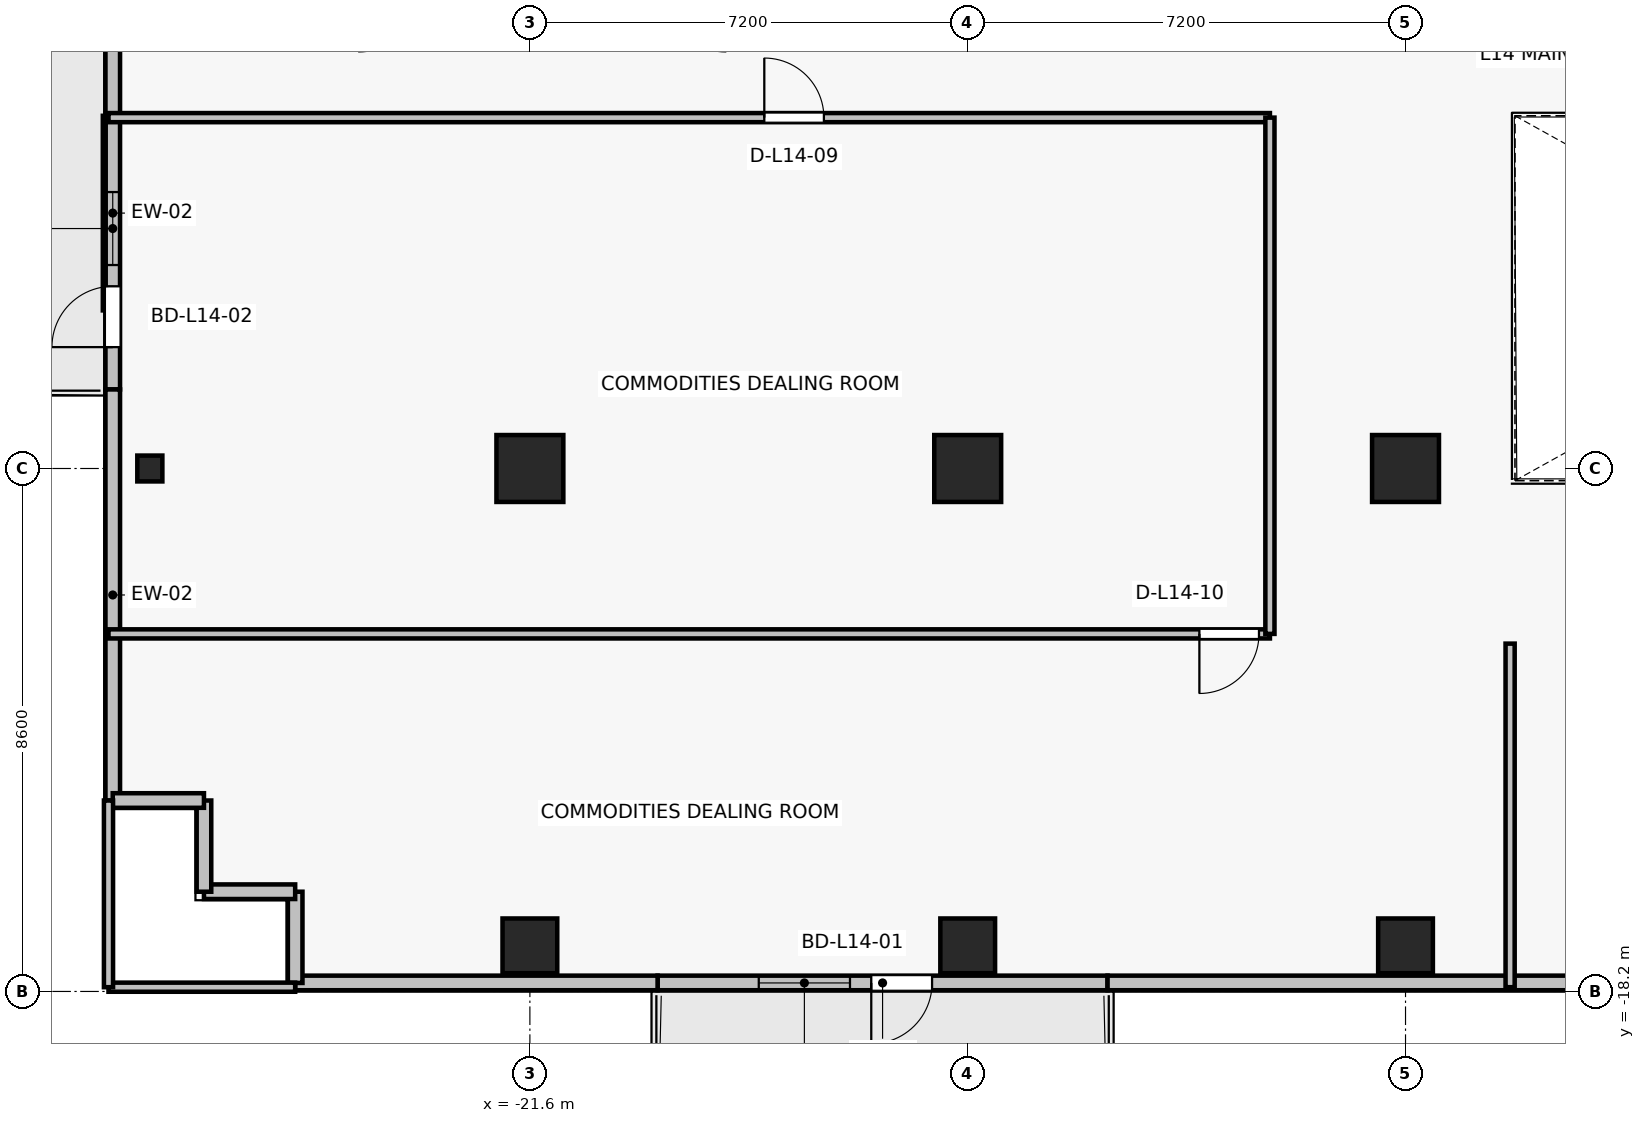
"""IFC4 building model, lengths in metres.
Left out: names, types, materials, properties, quantities, classifications, styles, units other than length and angle.
Written with IfcOpenShell. Run it as: python <this file> out.ifc"""

import sys

from ifc_helpers import new_model, si_unit, direction, frame, frame_2d, origin, origin_2d, place, context, subcontext, project, spatial, rectangle, i_section, extrude, source, transform, mapped, element, fill, save


model = new_model("IFC4")
c1 = context("Model", 3, precision=1e-05, world=origin(), true_north=direction((0.0, 1.0)))
c2 = subcontext(c1, "Body", "Model", "MODEL_VIEW")
j1 = project(units=[si_unit("LENGTHUNIT", "METRE"), si_unit("PLANEANGLEUNIT", "RADIAN")], contexts=[c1])
p1 = place(None, origin())
s1 = spatial("IfcSite", under=j1, at=p1, CompositionType="ELEMENT")
p2 = place(p1, origin())
s2 = spatial("IfcBuilding", under=s1, at=p2, CompositionType="ELEMENT")
p3 = place(p2, frame((0.0, 0.0, 53.8)))
s3 = spatial("IfcBuildingStorey", under=s2, at=p3, CompositionType="ELEMENT", Elevation=53.8)
for number, where, z_axis, x_axis in (
    (1, (-14.4, -9.6, 0.0), (0.0, 0.0, 1.0), (1.0, 0.0, 0.0)),
    (2, (-7.2, -9.6, 0.0), (0.0, 0.0, 1.0), (1.0, 0.0, 0.0)),
    (3, (-21.6, -9.6, 0.0), (0.0, 0.0, 1.0), (1.0, 0.0, 0.0)),
):
    element("IfcColumn", number, at=place(p3, frame(where, z_axis=z_axis, x_axis=x_axis)), inside=s3, PredefinedType="COLUMN", context=c2, shape_type="SweptSolid", body=[
        extrude(rectangle(XDim=1.1, YDim=1.1, at=origin_2d()), origin(), (0.0, 0.0, 1.0), 3.3),
    ])
for number, where, z_axis, x_axis in (
    (4, (-14.4, -17.45, 0.0), (0.0, 0.0, 1.0), (1.0, 0.0, 0.0)),
    (5, (-7.2, -17.45, 0.0), (0.0, 0.0, 1.0), (1.0, 0.0, 0.0)),
    (6, (-21.6, -17.45, 0.0), (0.0, 0.0, 1.0), (1.0, 0.0, 0.0)),
):
    element("IfcColumn", number, at=place(p3, frame(where, z_axis=z_axis, x_axis=x_axis)), inside=s3, PredefinedType="COLUMN", context=c2, shape_type="SweptSolid", body=[
        extrude(rectangle(XDim=0.9, YDim=0.9, at=origin_2d()), origin(), (0.0, 0.0, 1.0), 3.3),
    ])
p4 = place(p3, frame((-27.85, -9.6, 0.0), z_axis=(0.0, 0.0, 1.0), x_axis=(1.0, 0.0, 0.0)))
e7 = element("IfcColumn", 7, at=p4, inside=s3, PredefinedType="COLUMN", context=c2, shape_type="SweptSolid", body=[
    extrude(i_section(OverallWidth=0.412, OverallDepth=0.425, WebThickness=0.026, FlangeThickness=0.039, FilletRadius=0.015, at=origin_2d()), origin(), (0.0, 0.0, 1.0), 3.3),
])
p5 = place(p3, frame((-12.1, -18.06, 0.0), z_axis=(0.0, 0.0, 1.0), x_axis=(-1.0, 0.0, 0.0)))
e8 = element("IfcWall", 8, at=p5, inside=s3, PredefinedType="SOLIDWALL", context=c2, shape_type="SweptSolid", body=[
    extrude(rectangle(XDim=7.4, YDim=0.24, at=frame_2d((3.7, 0.0))), origin(), (0.0, 0.0, 1.0), 2.665),
])
p6 = place(p5, frame((2.886, 0.0, 0.0)))
e9 = element("IfcOpeningElement", 9, at=p6, cuts=e8, PredefinedType="OPENING", context=c2, shape_type="SweptSolid", body=[
    extrude(rectangle(XDim=1.0, YDim=2.2, at=frame_2d((0.5, 1.1))), frame((0.0, 0.13, 0.0), z_axis=(0.0, -1.0, 0.0), x_axis=(1.0, 0.0, 0.0)), (0.0, 0.0, 1.0), 0.26),
])
p7 = place(p5, frame((4.236, 0.0, 0.85)))
e10 = element("IfcOpeningElement", 10, at=p7, cuts=e8, PredefinedType="OPENING", context=c2, shape_type="SweptSolid", body=[
    extrude(rectangle(XDim=1.5, YDim=1.6, at=frame_2d((0.75, 0.8))), frame((0.0, 0.13, 0.0), z_axis=(0.0, -1.0, 0.0), x_axis=(1.0, 0.0, 0.0)), (0.0, 0.0, 1.0), 0.26),
])
p8 = place(p3, frame((-28.46, -8.3, 0.0), z_axis=(0.0, 0.0, 1.0), x_axis=(0.0, 1.0, 0.0)))
e11 = element("IfcWall", 11, at=p8, inside=s3, PredefinedType="SOLIDWALL", context=c2, shape_type="SweptSolid", body=[
    extrude(rectangle(XDim=5.8, YDim=0.24, at=frame_2d((2.9, 0.0))), origin(), (0.0, 0.0, 1.0), 3.075),
])
p9 = place(p8, frame((0.696, 0.0, 0.0)))
e12 = element("IfcOpeningElement", 12, at=p9, cuts=e11, PredefinedType="OPENING", context=c2, shape_type="SweptSolid", body=[
    extrude(rectangle(XDim=1.0, YDim=2.2, at=frame_2d((0.5, 1.1))), frame((0.0, 0.13, 0.0), z_axis=(0.0, -1.0, 0.0), x_axis=(1.0, 0.0, 0.0)), (0.0, 0.0, 1.0), 0.26),
])
p10 = place(p8, frame((2.046, 0.0, 0.85)))
e13 = element("IfcOpeningElement", 13, at=p10, cuts=e11, PredefinedType="OPENING", context=c2, shape_type="SweptSolid", body=[
    extrude(rectangle(XDim=1.2, YDim=1.5, at=frame_2d((0.6, 0.75))), frame((0.0, 0.13, 0.0), z_axis=(0.0, -1.0, 0.0), x_axis=(1.0, 0.0, 0.0)), (0.0, 0.0, 1.0), 0.26),
])
p11 = place(p3, frame((-28.46, -8.3, 0.0), z_axis=(0.0, 0.0, 1.0), x_axis=(0.0, -1.0, 0.0)))
e14 = element("IfcWall", 14, at=p11, inside=s3, PredefinedType="SOLIDWALL", context=c2, shape_type="SweptSolid", body=[
    extrude(rectangle(XDim=6.76, YDim=0.24, at=frame_2d((3.38, 0.0))), origin(), (0.0, 0.0, 1.0), 3.075),
])
p12 = place(p3, frame((-12.1, -18.06, 0.0), z_axis=(0.0, 0.0, 1.0), x_axis=(1.0, 0.0, 0.0)))
e15 = element("IfcWall", 15, at=p12, inside=s3, PredefinedType="SOLIDWALL", context=c2, shape_type="SweptSolid", body=[
    extrude(rectangle(XDim=8.76, YDim=0.24, at=frame_2d((4.38, 0.0))), origin(), (0.0, 0.0, 1.0), 3.075),
])
p13 = place(p3, frame((-25.46, -18.06, 0.0), z_axis=(0.0, 0.0, 1.0), x_axis=(1.0, 0.0, 0.0)))
e16 = element("IfcWall", 16, at=p13, inside=s3, PredefinedType="SOLIDWALL", context=c2, shape_type="SweptSolid", body=[
    extrude(rectangle(XDim=5.96, YDim=0.24, at=frame_2d((2.98, 0.0))), origin(), (0.0, 0.0, 1.0), 2.665),
])
for number, where, z_axis, x_axis in (
    (17, (-25.46, -16.56, 0.0), (0.0, 0.0, 1.0), (0.0, -1.0, 0.0)),
    (18, (-26.96, -16.56, 0.0), (0.0, 0.0, 1.0), (1.0, 0.0, 0.0)),
    (19, (-26.96, -15.06, 0.0), (0.0, 0.0, 1.0), (0.0, -1.0, 0.0)),
    (20, (-28.46, -15.06, 0.0), (0.0, 0.0, 1.0), (1.0, 0.0, 0.0)),
):
    element("IfcWall", number, at=place(p3, frame(where, z_axis=z_axis, x_axis=x_axis)), inside=s3, PredefinedType="SOLIDWALL", context=c2, shape_type="SweptSolid", body=[
        extrude(rectangle(XDim=1.5, YDim=0.24, at=frame_2d((0.75, 0.0))), origin(), (0.0, 0.0, 1.0), 3.075),
    ])
p14 = place(p3, frame((-9.43, -12.32, 0.0), z_axis=(0.0, 0.0, 1.0), x_axis=(-1.0, 0.0, 0.0)))
e21 = element("IfcWall", 21, at=p14, inside=s3, PredefinedType="PARTITIONING", context=c2, shape_type="SweptSolid", body=[
    extrude(rectangle(XDim=19.1, YDim=0.15, at=frame_2d((9.55, 0.0))), origin(), (0.0, 0.0, 1.0), 2.465),
])
p15 = place(p14, frame((0.18, 0.0, 0.0)))
e22 = element("IfcOpeningElement", 22, at=p15, cuts=e21, PredefinedType="OPENING", context=c2, shape_type="SweptSolid", body=[
    extrude(rectangle(XDim=0.98, YDim=2.15, at=frame_2d((0.49, 1.075))), frame((0.0, 0.085, 0.0), z_axis=(0.0, -1.0, 0.0), x_axis=(1.0, 0.0, 0.0)), (0.0, 0.0, 1.0), 0.17),
])
p16 = place(p3, frame((-28.53, -3.83, 0.0), z_axis=(0.0, 0.0, 1.0), x_axis=(1.0, 0.0, 0.0)))
e23 = element("IfcWall", 23, at=p16, inside=s3, PredefinedType="PARTITIONING", context=c2, shape_type="SweptSolid", body=[
    extrude(rectangle(XDim=19.1, YDim=0.15, at=frame_2d((9.55, 0.0))), origin(), (0.0, 0.0, 1.0), 2.465),
])
p17 = place(p16, frame((10.785, 0.0, 0.0)))
e24 = element("IfcOpeningElement", 24, at=p17, cuts=e23, PredefinedType="OPENING", context=c2, shape_type="SweptSolid", body=[
    extrude(rectangle(XDim=0.98, YDim=2.15, at=frame_2d((0.49, 1.075))), frame((0.0, 0.085, 0.0), z_axis=(0.0, -1.0, 0.0), x_axis=(1.0, 0.0, 0.0)), (0.0, 0.0, 1.0), 0.17),
])
p18 = place(p3, frame((-9.43, -3.83, 0.0), z_axis=(0.0, 0.0, 1.0), x_axis=(0.0, -1.0, 0.0)))
e25 = element("IfcWall", 25, at=p18, inside=s3, PredefinedType="PARTITIONING", context=c2, shape_type="SweptSolid", body=[
    extrude(rectangle(XDim=8.49, YDim=0.15, at=frame_2d((4.245, 0.0))), origin(), (0.0, 0.0, 1.0), 2.465),
])
p19 = place(p3, frame((-25.46, -18.13, 0.0), z_axis=(0.0, 0.0, 1.0), x_axis=(-1.0, 0.0, 0.0)))
e26 = element("IfcWall", 26, at=p19, inside=s3, PredefinedType="PARTITIONING", context=c2, shape_type="SweptSolid", body=[
    extrude(rectangle(XDim=3.07, YDim=0.15, at=frame_2d((1.535, 0.0))), origin(), (0.0, 0.0, 1.0), 2.665),
])
p20 = place(p3, frame((-28.53, -18.13, 0.0), z_axis=(0.0, 0.0, 1.0), x_axis=(0.0, 1.0, 0.0)))
e27 = element("IfcWall", 27, at=p20, inside=s3, PredefinedType="PARTITIONING", context=c2, shape_type="SweptSolid", body=[
    extrude(rectangle(XDim=3.07, YDim=0.15, at=frame_2d((1.535, 0.0))), origin(), (0.0, 0.0, 1.0), 3.075),
])
p21 = place(p3, frame((-5.48, -12.48, 0.0), z_axis=(0.0, 0.0, 1.0), x_axis=(0.0, -1.0, 0.0)))
e28 = element("IfcWall", 28, at=p21, inside=s3, PredefinedType="PARTITIONING", context=c2, shape_type="SweptSolid", body=[
    extrude(rectangle(XDim=5.65, YDim=0.15, at=frame_2d((2.825, 0.0))), origin(), (0.0, 0.0, 1.0), 2.465),
])
m1 = source(origin(), c2, "Body", "SweptSolid", [
    extrude(rectangle(XDim=1.0, YDim=2.2, at=frame_2d((0.5, 1.1))), frame((0.0, 0.025, 0.0), z_axis=(0.0, -1.0, 0.0), x_axis=(1.0, 0.0, 0.0)), (0.0, 0.0, 1.0), 0.05),
])
p22 = place(p6, origin())
e29 = element("IfcDoor", 29, at=p22, inside=s3, OperationType="SINGLE_SWING_RIGHT", PredefinedType="DOOR", context=c2, shape_type="MappedRepresentation", body=[
    mapped(m1, transform((0.0, 0.0, 0.0), x_axis=(1.0, 0.0, 0.0), y_axis=(0.0, 1.0, 0.0), z_axis=(0.0, 0.0, 1.0), scale=1.0)),
])
fill(e9, e29)
m2 = source(origin(), c2, "Body", "SweptSolid", [
    extrude(rectangle(XDim=1.5, YDim=1.6, at=frame_2d((0.75, 0.8))), frame((0.0, 0.03, 0.0), z_axis=(0.0, -1.0, 0.0), x_axis=(1.0, 0.0, 0.0)), (0.0, 0.0, 1.0), 0.06),
])
p23 = place(p7, origin())
e30 = element("IfcWindow", 30, at=p23, inside=s3, PartitioningType="SINGLE_PANEL", PredefinedType="WINDOW", context=c2, shape_type="MappedRepresentation", body=[
    mapped(m2, transform((0.0, 0.0, 0.0), x_axis=(1.0, 0.0, 0.0), y_axis=(0.0, 1.0, 0.0), z_axis=(0.0, 0.0, 1.0), scale=1.0)),
])
fill(e10, e30)
p24 = place(p9, origin())
e31 = element("IfcDoor", 31, at=p24, inside=s3, OperationType="SINGLE_SWING_LEFT", PredefinedType="DOOR", context=c2, shape_type="MappedRepresentation", body=[
    mapped(m1, transform((0.0, 0.0, 0.0), x_axis=(1.0, 0.0, 0.0), y_axis=(0.0, 1.0, 0.0), z_axis=(0.0, 0.0, 1.0), scale=1.0)),
])
fill(e12, e31)
m3 = source(origin(), c2, "Body", "SweptSolid", [
    extrude(rectangle(XDim=1.2, YDim=1.5, at=frame_2d((0.6, 0.75))), frame((0.0, 0.03, 0.0), z_axis=(0.0, -1.0, 0.0), x_axis=(1.0, 0.0, 0.0)), (0.0, 0.0, 1.0), 0.06),
])
p25 = place(p10, origin())
e32 = element("IfcWindow", 32, at=p25, inside=s3, PartitioningType="SINGLE_PANEL", PredefinedType="WINDOW", context=c2, shape_type="MappedRepresentation", body=[
    mapped(m3, transform((0.0, 0.0, 0.0), x_axis=(1.0, 0.0, 0.0), y_axis=(0.0, 1.0, 0.0), z_axis=(0.0, 0.0, 1.0), scale=1.0)),
])
fill(e13, e32)
m4 = source(origin(), c2, "Body", "SweptSolid", [
    extrude(rectangle(XDim=0.98, YDim=2.15, at=frame_2d((0.49, 1.075))), frame((0.0, 0.025, 0.0), z_axis=(0.0, -1.0, 0.0), x_axis=(1.0, 0.0, 0.0)), (0.0, 0.0, 1.0), 0.05),
])
p26 = place(p17, origin())
e33 = element("IfcDoor", 33, at=p26, inside=s3, OperationType="SINGLE_SWING_LEFT", PredefinedType="DOOR", context=c2, shape_type="MappedRepresentation", body=[
    mapped(m4, transform((0.0, 0.0, 0.0), x_axis=(1.0, 0.0, 0.0), y_axis=(0.0, 1.0, 0.0), z_axis=(0.0, 0.0, 1.0), scale=1.0)),
])
fill(e24, e33)
p27 = place(p15, origin())
e34 = element("IfcDoor", 34, at=p27, inside=s3, OperationType="SINGLE_SWING_RIGHT", PredefinedType="DOOR", context=c2, shape_type="MappedRepresentation", body=[
    mapped(m4, transform((0.0, 0.0, 0.0), x_axis=(1.0, 0.0, 0.0), y_axis=(0.0, 1.0, 0.0), z_axis=(0.0, 0.0, 1.0), scale=1.0)),
])
fill(e22, e34)
save(model, sys.argv[1])
